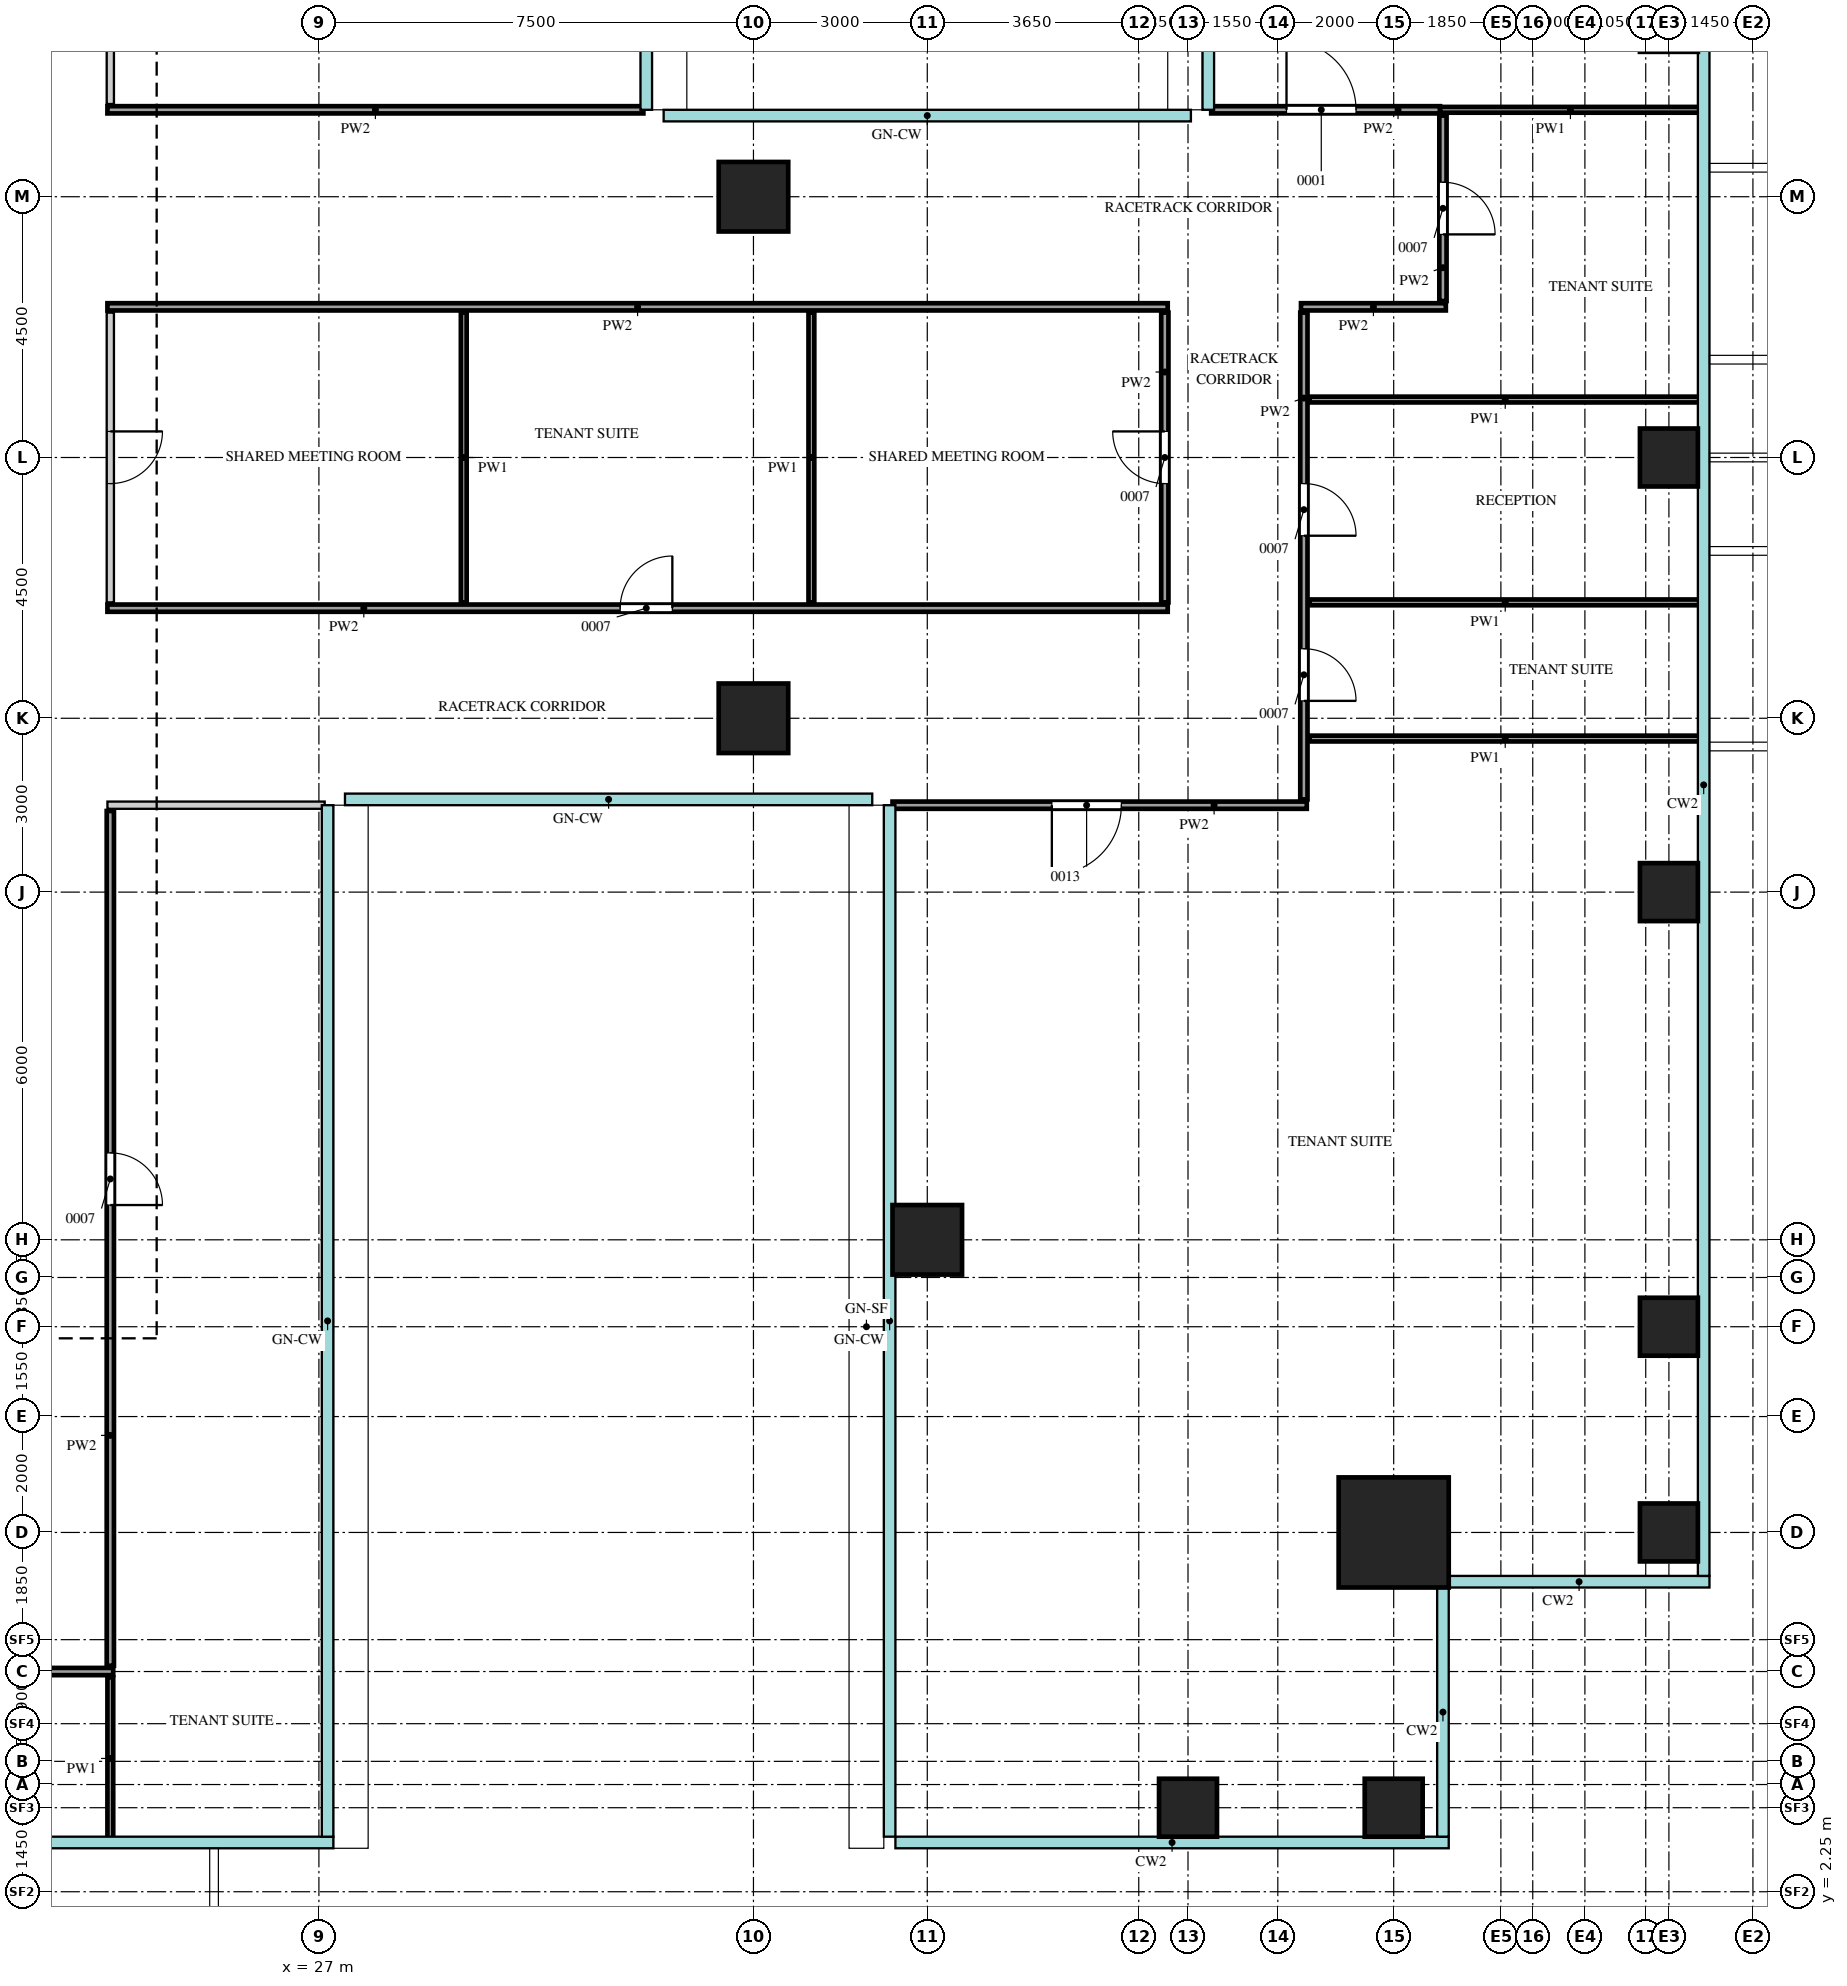
"""IFC4 building model, lengths in metres.
Left out: names, types, materials, properties, quantities, classifications, styles, units other than length and angle.
Written with IfcOpenShell. Run it as: python <this file> out.ifc"""

import sys

from ifc_helpers import new_model, si_unit, direction, frame, frame_2d, origin, origin_2d, place, context, subcontext, project, spatial, rectangle, extrude, source, transform, mapped, element, fill, save


model = new_model("IFC4")
c1 = context("Model", 3, precision=1e-05, world=origin(), true_north=direction((0.0, 1.0)))
c2 = subcontext(c1, "Body", "Model", "MODEL_VIEW")
j1 = project(units=[si_unit("LENGTHUNIT", "METRE"), si_unit("PLANEANGLEUNIT", "RADIAN")], contexts=[c1])
p1 = place(None, origin())
s1 = spatial("IfcSite", under=j1, at=p1, CompositionType="ELEMENT")
p2 = place(p1, origin())
s2 = spatial("IfcBuilding", under=s1, at=p2, CompositionType="ELEMENT")
p3 = place(p2, frame((0.0, 0.0, 176.7)))
s3 = spatial("IfcBuildingStorey", under=s2, at=p3, CompositionType="ELEMENT", Elevation=176.7)
m1 = source(origin(), c2, "Body", "SweptSolid", [
    extrude(rectangle(XDim=1.9, YDim=1.9, at=origin_2d()), origin(), (0.0, 0.0, 1.0), 4.0),
])
p4 = place(p3, frame((45.55, 8.45, 0.0), z_axis=(0.0, 0.0, 1.0), x_axis=(1.0, 0.0, 0.0)))
e1 = element("IfcColumn", 1, at=p4, inside=s3, PredefinedType="COLUMN", context=c2, shape_type="MappedRepresentation", body=[
    mapped(m1, transform((0.0, 0.0, 0.0))),
])
m2 = source(origin(), c2, "Body", "SweptSolid", [
    extrude(rectangle(XDim=1.0, YDim=1.0, at=origin_2d()), origin(), (0.0, 0.0, 1.0), 3.75),
])
for number, where, z_axis, x_axis in (
    (2, (42.0, 3.7, 0.0), (0.0, 0.0, 1.0), (1.0, 0.0, 0.0)),
    (3, (45.55, 3.7, 0.0), (0.0, 0.0, 1.0), (1.0, 0.0, 0.0)),
    (4, (50.3, 8.45, 0.0), (0.0, 0.0, 1.0), (1.0, 0.0, 0.0)),
    (5, (50.3, 12.0, 0.0), (0.0, 0.0, 1.0), (1.0, 0.0, 0.0)),
    (6, (50.3, 19.5, 0.0), (0.0, 0.0, 1.0), (1.0, 0.0, 0.0)),
    (7, (50.3, 27.0, 0.0), (0.0, 0.0, 1.0), (1.0, 0.0, 0.0)),
):
    element("IfcColumn", number, at=place(p3, frame(where, z_axis=z_axis, x_axis=x_axis)), inside=s3, PredefinedType="COLUMN", context=c2, shape_type="MappedRepresentation", body=[
        mapped(m2, transform((0.0, 0.0, 0.0))),
    ])
m3 = source(origin(), c2, "Body", "SweptSolid", [
    extrude(rectangle(XDim=1.2, YDim=1.2, at=origin_2d()), origin(), (0.0, 0.0, 1.0), 3.75),
])
for number, where, z_axis, x_axis in (
    (8, (37.5, 13.5, 0.0), (0.0, 0.0, 1.0), (1.0, 0.0, 0.0)),
    (9, (34.5, 22.5, 0.0), (0.0, 0.0, 1.0), (1.0, 0.0, 0.0)),
    (10, (34.5, 31.5, 0.0), (0.0, 0.0, 1.0), (1.0, 0.0, 0.0)),
):
    element("IfcColumn", number, at=place(p3, frame(where, z_axis=z_axis, x_axis=x_axis)), inside=s3, PredefinedType="COLUMN", context=c2, shape_type="MappedRepresentation", body=[
        mapped(m3, transform((0.0, 0.0, 0.0))),
    ])
m4 = source(origin(), c2, "Body", "SweptSolid", [
    extrude(rectangle(XDim=2.8, YDim=0.1, at=frame_2d((1.4, 0.0))), origin(), (0.0, 0.0, 1.0), 3.8),
])
p5 = place(p3, frame((23.4, 3.15, 0.0), z_axis=(0.0, 0.0, 1.0), x_axis=(0.0, 1.0, 0.0)))
e11 = element("IfcWall", 11, at=p5, inside=s3, PredefinedType="PARTITIONING", context=c2, shape_type="MappedRepresentation", body=[
    mapped(m4, transform((0.0, 0.0, 0.0))),
])
m5 = source(origin(), c2, "Body", "SweptSolid", [
    extrude(rectangle(XDim=15.8, YDim=0.125, at=frame_2d((7.9, 0.0))), origin(), (0.0, 0.0, 1.0), 3.8),
])
p6 = place(p3, frame((7.65, 6.05, 0.0), z_axis=(0.0, 0.0, 1.0), x_axis=(1.0, 0.0, 0.0)))
e12 = element("IfcWall", 12, at=p6, inside=s3, PredefinedType="PARTITIONING", context=c2, shape_type="MappedRepresentation", body=[
    mapped(m5, transform((0.0, 0.0, 0.0))),
])
m6 = source(origin(), c2, "Body", "SweptSolid", [
    extrude(rectangle(XDim=0.9, YDim=2.1, at=frame_2d((0.45, 1.05))), frame((0.0, 0.073, 0.0), z_axis=(0.0, -1.0, 0.0), x_axis=(1.0, 0.0, 0.0)), (0.0, 0.0, 1.0), 0.145),
])
p7 = place(p6, frame((1.8, 0.0, 0.0)))
e13 = element("IfcOpeningElement", 13, at=p7, cuts=e12, PredefinedType="OPENING", context=c2, shape_type="MappedRepresentation", body=[
    mapped(m6, transform((0.0, 0.0, 0.0))),
])
p8 = place(p6, frame((8.85, 0.0, 0.0)))
e14 = element("IfcOpeningElement", 14, at=p8, cuts=e12, PredefinedType="OPENING", context=c2, shape_type="MappedRepresentation", body=[
    mapped(m6, transform((0.0, 0.0, 0.0))),
])
m7 = source(origin(), c2, "Body", "SweptSolid", [
    extrude(rectangle(XDim=14.75, YDim=0.125, at=frame_2d((7.375, 0.0))), origin(), (0.0, 0.0, 1.0), 3.8),
])
p9 = place(p3, frame((23.4, 6.15, 0.0), z_axis=(0.0, 0.0, 1.0), x_axis=(0.0, 1.0, 0.0)))
e15 = element("IfcWall", 15, at=p9, inside=s3, PredefinedType="PARTITIONING", context=c2, shape_type="MappedRepresentation", body=[
    mapped(m7, transform((0.0, 0.0, 0.0))),
])
p10 = place(p9, frame((7.95, 0.0, 0.0)))
e16 = element("IfcOpeningElement", 16, at=p10, cuts=e15, PredefinedType="OPENING", context=c2, shape_type="MappedRepresentation", body=[
    mapped(m6, transform((0.0, 0.0, 0.0))),
])
m8 = source(origin(), c2, "Body", "SweptSolid", [
    extrude(rectangle(XDim=3.75, YDim=0.125, at=frame_2d((1.875, 0.0))), origin(), (0.0, 0.0, 1.0), 3.8),
])
p11 = place(p3, frame((23.35, 21.0, 0.0), z_axis=(0.0, 0.0, 1.0), x_axis=(1.0, 0.0, 0.0)))
e17 = element("IfcWall", 17, at=p11, inside=s3, PredefinedType="PARTITIONING", context=c2, shape_type="MappedRepresentation", body=[
    mapped(m8, transform((0.0, 0.0, 0.0))),
])
m9 = source(origin(), c2, "Body", "SweptSolid", [
    extrude(rectangle(XDim=7.15, YDim=0.125, at=frame_2d((3.575, 0.0))), origin(), (0.0, 0.0, 1.0), 3.8),
])
p12 = place(p3, frame((36.9, 21.0, 0.0), z_axis=(0.0, 0.0, 1.0), x_axis=(1.0, 0.0, 0.0)))
e18 = element("IfcWall", 18, at=p12, inside=s3, PredefinedType="PARTITIONING", context=c2, shape_type="MappedRepresentation", body=[
    mapped(m9, transform((0.0, 0.0, 0.0))),
])
m10 = source(origin(), c2, "Body", "SweptSolid", [
    extrude(rectangle(XDim=1.2, YDim=2.1, at=frame_2d((0.6, 1.05))), frame((0.0, 0.073, 0.0), z_axis=(0.0, -1.0, 0.0), x_axis=(1.0, 0.0, 0.0)), (0.0, 0.0, 1.0), 0.145),
])
p13 = place(p12, frame((2.75, 0.0, 0.0)))
e19 = element("IfcOpeningElement", 19, at=p13, cuts=e18, PredefinedType="OPENING", context=c2, shape_type="MappedRepresentation", body=[
    mapped(m10, transform((0.0, 0.0, 0.0))),
])
m11 = source(origin(), c2, "Body", "SweptSolid", [
    extrude(rectangle(XDim=8.4, YDim=0.125, at=frame_2d((4.2, 0.0))), origin(), (0.0, 0.0, 1.0), 3.8),
])
p14 = place(p3, frame((44.0, 21.1, 0.0), z_axis=(0.0, 0.0, 1.0), x_axis=(0.0, 1.0, 0.0)))
e20 = element("IfcWall", 20, at=p14, inside=s3, PredefinedType="PARTITIONING", context=c2, shape_type="MappedRepresentation", body=[
    mapped(m11, transform((0.0, 0.0, 0.0))),
])
p15 = place(p14, frame((1.7, 0.0, 0.0)))
e21 = element("IfcOpeningElement", 21, at=p15, cuts=e20, PredefinedType="OPENING", context=c2, shape_type="MappedRepresentation", body=[
    mapped(m6, transform((0.0, 0.0, 0.0))),
])
p16 = place(p14, frame((4.55, 0.0, 0.0)))
e22 = element("IfcOpeningElement", 22, at=p16, cuts=e20, PredefinedType="OPENING", context=c2, shape_type="MappedRepresentation", body=[
    mapped(m6, transform((0.0, 0.0, 0.0))),
])
m12 = source(origin(), c2, "Body", "SweptSolid", [
    extrude(rectangle(XDim=6.75, YDim=0.1, at=frame_2d((3.375, 0.0))), origin(), (0.0, 0.0, 1.0), 3.8),
])
p17 = place(p3, frame((44.1, 22.15, 0.0), z_axis=(0.0, 0.0, 1.0), x_axis=(1.0, 0.0, 0.0)))
e23 = element("IfcWall", 23, at=p17, inside=s3, PredefinedType="PARTITIONING", context=c2, shape_type="MappedRepresentation", body=[
    mapped(m12, transform((0.0, 0.0, 0.0))),
])
m13 = source(origin(), c2, "Body", "SweptSolid", [
    extrude(rectangle(XDim=18.3, YDim=0.125, at=frame_2d((9.15, 0.0))), origin(), (0.0, 0.0, 1.0), 3.8),
])
p18 = place(p3, frame((23.35, 24.4, 0.0), z_axis=(0.0, 0.0, 1.0), x_axis=(1.0, 0.0, 0.0)))
e24 = element("IfcWall", 24, at=p18, inside=s3, PredefinedType="PARTITIONING", context=c2, shape_type="MappedRepresentation", body=[
    mapped(m13, transform((0.0, 0.0, 0.0))),
])
p19 = place(p18, frame((8.85, 0.0, 0.0)))
e25 = element("IfcOpeningElement", 25, at=p19, cuts=e24, PredefinedType="OPENING", context=c2, shape_type="MappedRepresentation", body=[
    mapped(m6, transform((0.0, 0.0, 0.0))),
])
m14 = source(origin(), c2, "Body", "SweptSolid", [
    extrude(rectangle(XDim=5.0, YDim=0.125, at=frame_2d((2.5, 0.0))), origin(), (0.0, 0.0, 1.0), 3.8),
])
p20 = place(p3, frame((23.4, 24.5, 0.0), z_axis=(0.0, 0.0, 1.0), x_axis=(0.0, 1.0, 0.0)))
e26 = element("IfcWall", 26, at=p20, inside=s3, PredefinedType="PARTITIONING", context=c2, shape_type="MappedRepresentation", body=[
    mapped(m14, transform((0.0, 0.0, 0.0))),
])
p21 = place(p20, frame((2.05, 0.0, 0.0)))
e27 = element("IfcOpeningElement", 27, at=p21, cuts=e26, PredefinedType="OPENING", context=c2, shape_type="MappedRepresentation", body=[
    mapped(m6, transform((0.0, 0.0, 0.0))),
])
m15 = source(origin(), c2, "Body", "SweptSolid", [
    extrude(rectangle(XDim=5.0, YDim=0.1, at=frame_2d((2.5, 0.0))), origin(), (0.0, 0.0, 1.0), 3.8),
])
for number, where, z_axis, x_axis in (
    (28, (29.5, 24.5, 0.0), (0.0, 0.0, 1.0), (0.0, 1.0, 0.0)),
    (29, (35.5, 24.5, 0.0), (0.0, 0.0, 1.0), (0.0, 1.0, 0.0)),
):
    element("IfcWall", number, at=place(p3, frame(where, z_axis=z_axis, x_axis=x_axis)), inside=s3, PredefinedType="PARTITIONING", context=c2, shape_type="MappedRepresentation", body=[
        mapped(m15, transform((0.0, 0.0, 0.0))),
    ])
p22 = place(p3, frame((41.6, 24.5, 0.0), z_axis=(0.0, 0.0, 1.0), x_axis=(0.0, 1.0, 0.0)))
e30 = element("IfcWall", 30, at=p22, inside=s3, PredefinedType="PARTITIONING", context=c2, shape_type="MappedRepresentation", body=[
    mapped(m14, transform((0.0, 0.0, 0.0))),
])
p23 = place(p22, frame((2.05, 0.0, 0.0)))
e31 = element("IfcOpeningElement", 31, at=p23, cuts=e30, PredefinedType="OPENING", context=c2, shape_type="MappedRepresentation", body=[
    mapped(m6, transform((0.0, 0.0, 0.0))),
])
for number, where, z_axis, x_axis in (
    (32, (44.1, 24.5, 0.0), (0.0, 0.0, 1.0), (1.0, 0.0, 0.0)),
    (33, (44.1, 28.0, 0.0), (0.0, 0.0, 1.0), (1.0, 0.0, 0.0)),
):
    element("IfcWall", number, at=place(p3, frame(where, z_axis=z_axis, x_axis=x_axis)), inside=s3, PredefinedType="PARTITIONING", context=c2, shape_type="MappedRepresentation", body=[
        mapped(m12, transform((0.0, 0.0, 0.0))),
    ])
p24 = place(p3, frame((23.35, 29.6, 0.0), z_axis=(0.0, 0.0, 1.0), x_axis=(1.0, 0.0, 0.0)))
e34 = element("IfcWall", 34, at=p24, inside=s3, PredefinedType="PARTITIONING", context=c2, shape_type="MappedRepresentation", body=[
    mapped(m13, transform((0.0, 0.0, 0.0))),
])
m16 = source(origin(), c2, "Body", "SweptSolid", [
    extrude(rectangle(XDim=2.5, YDim=0.125, at=frame_2d((1.25, 0.0))), origin(), (0.0, 0.0, 1.0), 3.8),
])
p25 = place(p3, frame((43.95, 29.6, 0.0), z_axis=(0.0, 0.0, 1.0), x_axis=(1.0, 0.0, 0.0)))
e35 = element("IfcWall", 35, at=p25, inside=s3, PredefinedType="PARTITIONING", context=c2, shape_type="MappedRepresentation", body=[
    mapped(m16, transform((0.0, 0.0, 0.0))),
])
m17 = source(origin(), c2, "Body", "SweptSolid", [
    extrude(rectangle(XDim=3.2, YDim=0.125, at=frame_2d((1.6, 0.0))), origin(), (0.0, 0.0, 1.0), 3.8),
])
p26 = place(p3, frame((46.4, 29.7, 0.0), z_axis=(0.0, 0.0, 1.0), x_axis=(0.0, 1.0, 0.0)))
e36 = element("IfcWall", 36, at=p26, inside=s3, PredefinedType="PARTITIONING", context=c2, shape_type="MappedRepresentation", body=[
    mapped(m17, transform((0.0, 0.0, 0.0))),
])
p27 = place(p26, frame((1.15, 0.0, 0.0)))
e37 = element("IfcOpeningElement", 37, at=p27, cuts=e36, PredefinedType="OPENING", context=c2, shape_type="MappedRepresentation", body=[
    mapped(m6, transform((0.0, 0.0, 0.0))),
])
m18 = source(origin(), c2, "Body", "SweptSolid", [
    extrude(rectangle(XDim=9.25, YDim=0.125, at=frame_2d((4.625, 0.0))), origin(), (0.0, 0.0, 1.0), 3.8),
])
p28 = place(p3, frame((23.35, 33.0, 0.0), z_axis=(0.0, 0.0, 1.0), x_axis=(1.0, 0.0, 0.0)))
e38 = element("IfcWall", 38, at=p28, inside=s3, PredefinedType="PARTITIONING", context=c2, shape_type="MappedRepresentation", body=[
    mapped(m18, transform((0.0, 0.0, 0.0))),
])
m19 = source(origin(), c2, "Body", "SweptSolid", [
    extrude(rectangle(XDim=3.95, YDim=0.125, at=frame_2d((1.975, 0.0))), origin(), (0.0, 0.0, 1.0), 3.8),
])
p29 = place(p3, frame((42.4, 33.0, 0.0), z_axis=(0.0, 0.0, 1.0), x_axis=(1.0, 0.0, 0.0)))
e39 = element("IfcWall", 39, at=p29, inside=s3, PredefinedType="PARTITIONING", context=c2, shape_type="MappedRepresentation", body=[
    mapped(m19, transform((0.0, 0.0, 0.0))),
])
p30 = place(p29, frame((1.3, 0.0, 0.0)))
e40 = element("IfcOpeningElement", 40, at=p30, cuts=e39, PredefinedType="OPENING", context=c2, shape_type="MappedRepresentation", body=[
    mapped(m10, transform((0.0, 0.0, 0.0))),
])
m20 = source(origin(), c2, "Body", "SweptSolid", [
    extrude(rectangle(XDim=4.5, YDim=0.1, at=frame_2d((2.25, 0.0))), origin(), (0.0, 0.0, 1.0), 3.8),
])
p31 = place(p3, frame((46.35, 33.0, 0.0), z_axis=(0.0, 0.0, 1.0), x_axis=(1.0, 0.0, 0.0)))
e41 = element("IfcWall", 41, at=p31, inside=s3, PredefinedType="PARTITIONING", context=c2, shape_type="MappedRepresentation", body=[
    mapped(m20, transform((0.0, 0.0, 0.0))),
])
m21 = source(origin(), c2, "Body", "SweptSolid", [
    extrude(rectangle(XDim=6.3, YDim=0.125, at=frame_2d((3.15, 0.0))), origin(), (0.0, 0.0, 1.0), 3.8),
])
p32 = place(p3, frame((23.4, 33.1, 0.0), z_axis=(0.0, 0.0, 1.0), x_axis=(0.0, 1.0, 0.0)))
e42 = element("IfcWall", 42, at=p32, inside=s3, PredefinedType="PARTITIONING", context=c2, shape_type="MappedRepresentation", body=[
    mapped(m21, transform((0.0, 0.0, 0.0))),
])
m22 = source(origin(), c2, "Body", "SweptSolid", [
    extrude(rectangle(XDim=0.9, YDim=2.1, at=frame_2d((0.45, 1.05))), frame((0.0, 0.025, 0.0), z_axis=(0.0, -1.0, 0.0), x_axis=(1.0, 0.0, 0.0)), (0.0, 0.0, 1.0), 0.05),
])
p33 = place(p10, origin())
e43 = element("IfcDoor", 43, at=p33, inside=s3, OperationType="SINGLE_SWING_LEFT", PredefinedType="DOOR", context=c2, shape_type="MappedRepresentation", body=[
    mapped(m22, transform((0.0, 0.0, 0.0))),
])
fill(e16, e43)
m23 = source(origin(), c2, "Body", "SweptSolid", [
    extrude(rectangle(XDim=1.2, YDim=2.1, at=frame_2d((0.6, 1.05))), frame((0.0, 0.025, 0.0), z_axis=(0.0, -1.0, 0.0), x_axis=(1.0, 0.0, 0.0)), (0.0, 0.0, 1.0), 0.05),
])
p34 = place(p13, origin())
e44 = element("IfcDoor", 44, at=p34, inside=s3, OperationType="SINGLE_SWING_LEFT", PredefinedType="DOOR", context=c2, shape_type="MappedRepresentation", body=[
    mapped(m23, transform((0.0, 0.0, 0.0))),
])
fill(e19, e44)
p35 = place(p30, origin())
e45 = element("IfcDoor", 45, at=p35, inside=s3, OperationType="SINGLE_SWING_RIGHT", PredefinedType="DOOR", context=c2, shape_type="MappedRepresentation", body=[
    mapped(m23, transform((0.0, 0.0, 0.0))),
])
fill(e40, e45)
p36 = place(p15, origin())
e46 = element("IfcDoor", 46, at=p36, inside=s3, OperationType="SINGLE_SWING_LEFT", PredefinedType="DOOR", context=c2, shape_type="MappedRepresentation", body=[
    mapped(m22, transform((0.0, 0.0, 0.0))),
])
fill(e21, e46)
p37 = place(p16, origin())
e47 = element("IfcDoor", 47, at=p37, inside=s3, OperationType="SINGLE_SWING_LEFT", PredefinedType="DOOR", context=c2, shape_type="MappedRepresentation", body=[
    mapped(m22, transform((0.0, 0.0, 0.0))),
])
fill(e22, e47)
p38 = place(p27, origin())
e48 = element("IfcDoor", 48, at=p38, inside=s3, OperationType="SINGLE_SWING_LEFT", PredefinedType="DOOR", context=c2, shape_type="MappedRepresentation", body=[
    mapped(m22, transform((0.0, 0.0, 0.0))),
])
fill(e37, e48)
p39 = place(p21, origin())
e49 = element("IfcDoor", 49, at=p39, inside=s3, OperationType="SINGLE_SWING_RIGHT", PredefinedType="DOOR", context=c2, shape_type="MappedRepresentation", body=[
    mapped(m22, transform((0.0, 0.0, 0.0))),
])
fill(e27, e49)
p40 = place(p19, origin())
e50 = element("IfcDoor", 50, at=p40, inside=s3, OperationType="SINGLE_SWING_LEFT", PredefinedType="DOOR", context=c2, shape_type="MappedRepresentation", body=[
    mapped(m22, transform((0.0, 0.0, 0.0))),
])
fill(e25, e50)
p41 = place(p23, origin())
e51 = element("IfcDoor", 51, at=p41, inside=s3, OperationType="SINGLE_SWING_LEFT", PredefinedType="DOOR", context=c2, shape_type="MappedRepresentation", body=[
    mapped(m22, transform((0.0, 0.0, 0.0))),
])
fill(e31, e51)
save(model, sys.argv[1])
